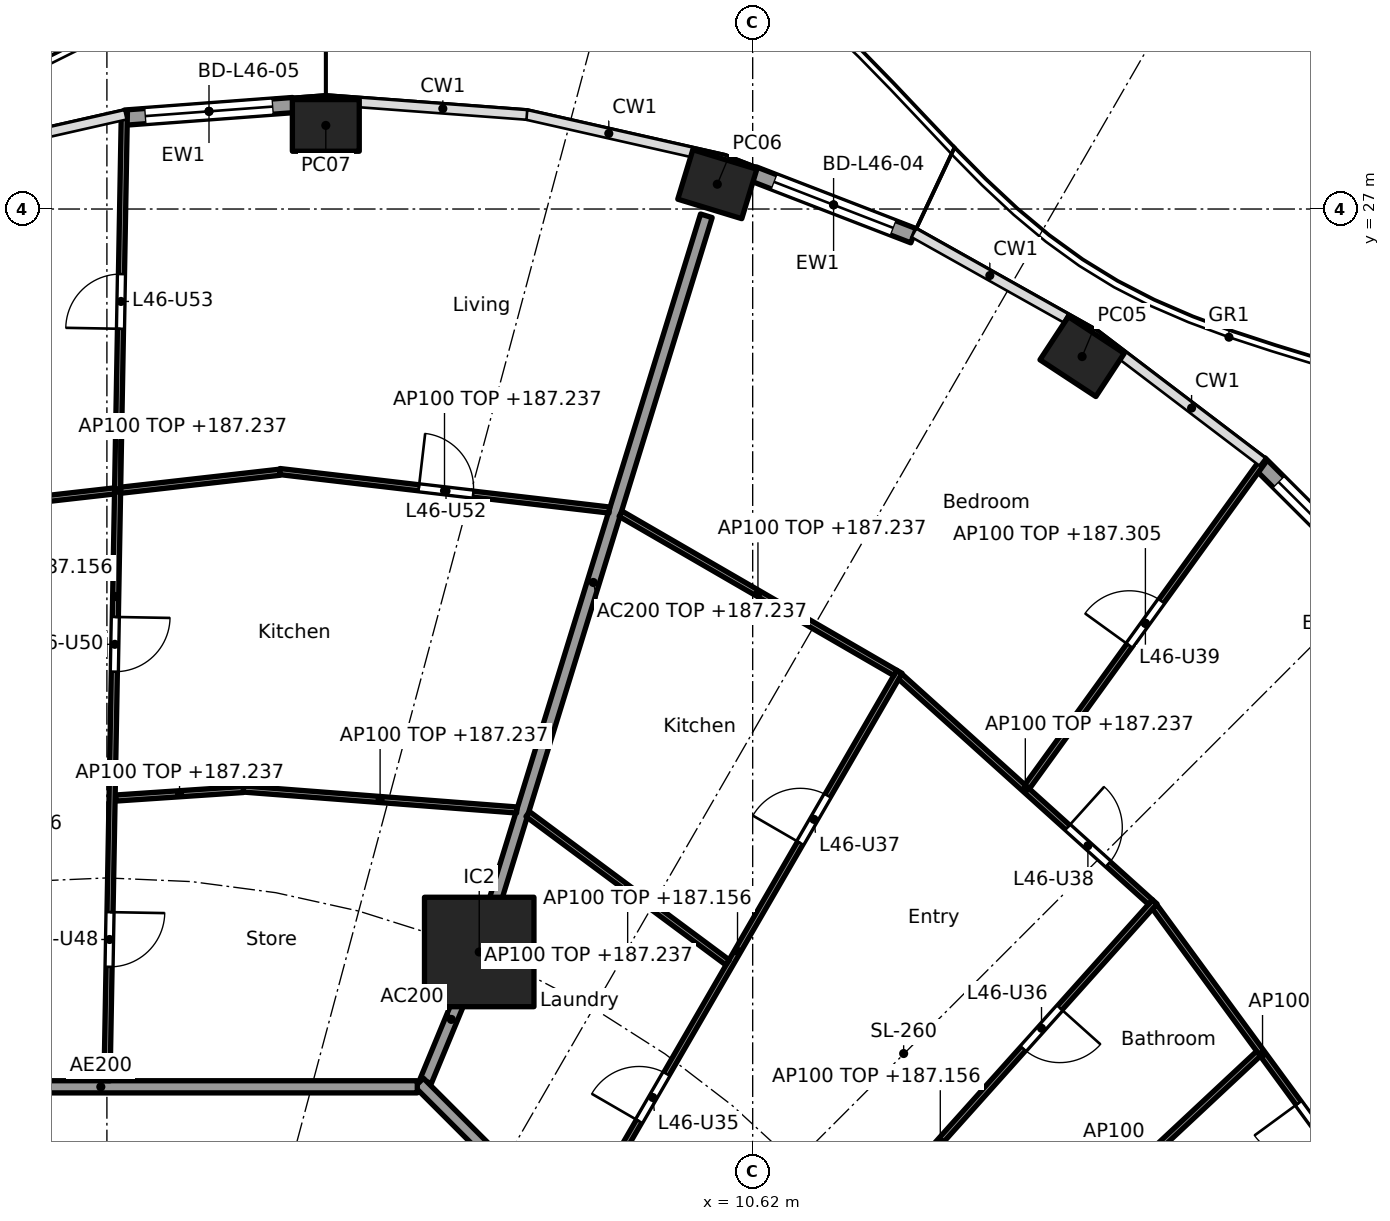
"""IFC4 building model, lengths in metres.
Left out: names, types, materials, properties, quantities, classifications, styles, units other than length and angle.
Written with IfcOpenShell. Run it as: python <this file> out.ifc"""

import sys

from ifc_helpers import new_model, si_unit, direction, frame, frame_2d, origin, origin_2d, place, context, subcontext, project, spatial, rectangle, hollow_rectangle, extrude, element, fill, save


model = new_model("IFC4")
c1 = context("Model", 3, precision=1e-05, world=origin(), true_north=direction((0.0, 1.0)))
c2 = subcontext(c1, "Body", "Model", "MODEL_VIEW")
j1 = project(units=[si_unit("LENGTHUNIT", "METRE"), si_unit("PLANEANGLEUNIT", "RADIAN")], contexts=[c1])
p1 = place(None, origin())
s1 = spatial("IfcSite", under=j1, at=p1, CompositionType="ELEMENT")
p2 = place(p1, origin())
s2 = spatial("IfcBuilding", under=s1, at=p2, CompositionType="ELEMENT")
p3 = place(p2, frame((0.0, 0.0, 184.4)))
s3 = spatial("IfcBuildingStorey", under=s2, at=p3, CompositionType="ELEMENT", Elevation=184.4)
for number, where, z_axis, x_axis in (
    (1, (16.038, 24.573, 0.0), (0.0, 0.0, 1.0), (-0.836, 0.549, 0.0)),
    (2, (10.038, 27.408, 0.0), (0.0, 0.0, 1.0), (-0.957, 0.292, 0.0)),
    (3, (3.6, 28.375, 0.0), (0.0, 0.0, 1.0), (-1.0, 0.0, 0.0)),
):
    element("IfcColumn", number, at=place(p3, frame(where, z_axis=z_axis, x_axis=x_axis)), inside=s3, PredefinedType="COLUMN", context=c2, shape_type="SweptSolid", body=[
        extrude(hollow_rectangle(XDim=1.1, YDim=0.85, WallThickness=0.036, at=origin_2d()), origin(), (0.0, 0.0, 1.0), 3.7),
    ])
p4 = place(p3, frame((6.123, 14.782, 0.0), z_axis=(0.0, 0.0, 1.0), x_axis=(1.0, 0.0, 0.0)))
e4 = element("IfcColumn", 4, at=p4, inside=s3, PredefinedType="COLUMN", context=c2, shape_type="SweptSolid", body=[
    extrude(rectangle(XDim=1.8, YDim=1.8, at=origin_2d()), origin(), (0.0, 0.0, 1.0), 3.7),
])
p5 = place(p3, frame((18.959, 22.82, 0.0), z_axis=(0.0, 0.0, 1.0), x_axis=(0.707844845069, -0.706367946122, 0.0)))
e5 = element("IfcWall", 5, at=p5, inside=s3, PredefinedType="SOLIDWALL", context=c2, shape_type="SweptSolid", body=[
    extrude(rectangle(XDim=2.976, YDim=0.25, at=frame_2d((1.488, 0.0))), origin(), (0.0, 0.0, 1.0), 3.44),
])
p6 = place(p5, frame((0.438, 0.0, 0.0)))
e6 = element("IfcOpeningElement", 6, at=p6, cuts=e5, PredefinedType="OPENING", context=c2, shape_type="SweptSolid", body=[
    extrude(rectangle(XDim=2.1, YDim=2.4, at=frame_2d((1.05, 1.2))), frame((0.0, 0.135, 0.0), z_axis=(0.0, -1.0, 0.0), x_axis=(1.0, 0.0, 0.0)), (0.0, 0.0, 1.0), 0.27),
])
p7 = place(p3, frame((10.635, 27.576, 0.0), z_axis=(0.0, 0.0, 1.0), x_axis=(0.932806734513, -0.360377019311, 0.0)))
e7 = element("IfcWall", 7, at=p7, inside=s3, PredefinedType="SOLIDWALL", context=c2, shape_type="SweptSolid", body=[
    extrude(rectangle(XDim=2.82, YDim=0.25, at=frame_2d((1.41, 0.0))), origin(), (0.0, 0.0, 1.0), 3.44),
])
p8 = place(p7, frame((0.36, 0.0, 0.0)))
e8 = element("IfcOpeningElement", 8, at=p8, cuts=e7, PredefinedType="OPENING", context=c2, shape_type="SweptSolid", body=[
    extrude(rectangle(XDim=2.1, YDim=2.4, at=frame_2d((1.05, 1.2))), frame((0.0, 0.135, 0.0), z_axis=(0.0, -1.0, 0.0), x_axis=(1.0, 0.0, 0.0)), (0.0, 0.0, 1.0), 0.27),
])
p9 = place(p3, frame((0.297, 28.503, 0.0), z_axis=(0.0, 0.0, 1.0), x_axis=(0.997232064422, 0.074351931305, 0.0)))
e9 = element("IfcWall", 9, at=p9, inside=s3, PredefinedType="SOLIDWALL", context=c2, shape_type="SweptSolid", body=[
    extrude(rectangle(XDim=2.771, YDim=0.25, at=frame_2d((1.386, 0.0))), origin(), (0.0, 0.0, 1.0), 3.44),
])
p10 = place(p9, frame((0.336, 0.0, 0.0)))
e10 = element("IfcOpeningElement", 10, at=p10, cuts=e9, PredefinedType="OPENING", context=c2, shape_type="SweptSolid", body=[
    extrude(rectangle(XDim=2.1, YDim=2.4, at=frame_2d((1.05, 1.2))), frame((0.0, 0.135, 0.0), z_axis=(0.0, -1.0, 0.0), x_axis=(1.0, 0.0, 0.0)), (0.0, 0.0, 1.0), 0.27),
])
p11 = place(p3, frame((5.243, 12.657, 0.0), z_axis=(0.0, 0.0, 1.0), x_axis=(0.382747093259, 0.923853160736, 0.0)))
e11 = element("IfcWall", 11, at=p11, inside=s3, PredefinedType="PARTITIONING", context=c2, shape_type="SweptSolid", body=[
    extrude(rectangle(XDim=2.2, YDim=0.2, at=frame_2d((1.1, 0.0))), origin(), (0.0, 0.0, 1.0), 3.44),
])
p12 = place(p3, frame((6.138, 14.83, 0.0), z_axis=(0.0, 0.0, 1.0), x_axis=(0.294818517221, 0.955553264818, 0.0)))
e12 = element("IfcWall", 12, at=p12, inside=s3, PredefinedType="PARTITIONING", context=c2, shape_type="SweptSolid", body=[
    extrude(rectangle(XDim=12.619, YDim=0.2, at=frame_2d((6.31, 0.0))), origin(), (0.0, 0.0, 1.0), 2.837),
])
p13 = place(p3, frame((12.635, 5.134, 0.0), z_axis=(0.0, 0.0, 1.0), x_axis=(-0.707106781187, 0.707106781187, 0.0)))
e13 = element("IfcWall", 13, at=p13, inside=s3, PredefinedType="PARTITIONING", context=c2, shape_type="SweptSolid", body=[
    extrude(rectangle(XDim=10.609, YDim=0.2, at=frame_2d((5.305, 0.0))), origin(), (0.0, 0.0, 1.0), 3.44),
])
p14 = place(p13, frame((4.804, 0.0, 0.0)))
e14 = element("IfcOpeningElement", 14, at=p14, cuts=e13, PredefinedType="OPENING", context=c2, shape_type="SweptSolid", body=[
    extrude(rectangle(XDim=1.0, YDim=2.1, at=frame_2d((0.5, 1.05))), frame((0.0, 0.11, 0.0), z_axis=(0.0, -1.0, 0.0), x_axis=(1.0, 0.0, 0.0)), (0.0, 0.0, 1.0), 0.22),
])
p15 = place(p3, frame((5.104, 12.565, 0.0), z_axis=(0.0, 0.0, 1.0), x_axis=(-1.0, 0.0, 0.0)))
e15 = element("IfcWall", 15, at=p15, inside=s3, PredefinedType="PARTITIONING", context=c2, shape_type="SweptSolid", body=[
    extrude(rectangle(XDim=10.409, YDim=0.2, at=frame_2d((5.205, 0.0))), origin(), (0.0, 0.0, 1.0), 3.44),
])
p16 = place(p15, frame((6.339, 0.0, 0.0)))
e16 = element("IfcOpeningElement", 16, at=p16, cuts=e15, PredefinedType="OPENING", context=c2, shape_type="SweptSolid", body=[
    extrude(rectangle(XDim=1.0, YDim=2.1, at=frame_2d((0.5, 1.05))), frame((0.0, 0.11, 0.0), z_axis=(0.0, -1.0, 0.0), x_axis=(1.0, 0.0, 0.0)), (0.0, 0.0, 1.0), 0.22),
])
p17 = place(p3, frame((20.781, 10.681, 0.0), z_axis=(0.0, 0.0, 1.0), x_axis=(-0.591117075283, 0.806585769345, 0.0)))
e17 = element("IfcWall", 17, at=p17, inside=s3, PredefinedType="PARTITIONING", context=c2, shape_type="SweptSolid", body=[
    extrude(rectangle(XDim=6.01, YDim=0.1, at=frame_2d((3.005, 0.0))), origin(), (0.0, 0.0, 1.0), 2.837),
])
p18 = place(p17, frame((1.103, 0.0, 0.0)))
e18 = element("IfcOpeningElement", 18, at=p18, cuts=e17, PredefinedType="OPENING", context=c2, shape_type="SweptSolid", body=[
    extrude(rectangle(XDim=0.9, YDim=2.1, at=frame_2d((0.45, 1.05))), frame((0.0, 0.06, 0.0), z_axis=(0.0, -1.0, 0.0), x_axis=(1.0, 0.0, 0.0)), (0.0, 0.0, 1.0), 0.12),
])
p19 = place(p3, frame((15.152, 9.573, 0.0), z_axis=(0.0, 0.0, 1.0), x_axis=(0.730723083214, 0.682673989294, 0.0)))
e19 = element("IfcWall", 19, at=p19, inside=s3, PredefinedType="PARTITIONING", context=c2, shape_type="SweptSolid", body=[
    extrude(rectangle(XDim=5.183, YDim=0.1, at=frame_2d((2.591, 0.0))), origin(), (0.0, 0.0, 1.0), 3.44),
])
p20 = place(p3, frame((10.178, 7.732, 0.0), z_axis=(0.0, 0.0, 1.0), x_axis=(0.667280084362, 0.744806880348, 0.0)))
e20 = element("IfcWall", 20, at=p20, inside=s3, PredefinedType="PARTITIONING", context=c2, shape_type="SweptSolid", body=[
    extrude(rectangle(XDim=10.572, YDim=0.1, at=frame_2d((5.286, 0.0))), origin(), (0.0, 0.0, 1.0), 2.756),
])
p21 = place(p20, frame((2.07, 0.0, 0.0)))
e21 = element("IfcOpeningElement", 21, at=p21, cuts=e20, PredefinedType="OPENING", context=c2, shape_type="SweptSolid", body=[
    extrude(rectangle(XDim=0.9, YDim=2.1, at=frame_2d((0.45, 1.05))), frame((0.0, 0.06, 0.0), z_axis=(0.0, -1.0, 0.0), x_axis=(1.0, 0.0, 0.0)), (0.0, 0.0, 1.0), 0.12),
])
p22 = place(p20, frame((7.331, 0.0, 0.0)))
e22 = element("IfcOpeningElement", 22, at=p22, cuts=e20, PredefinedType="OPENING", context=c2, shape_type="SweptSolid", body=[
    extrude(rectangle(XDim=0.9, YDim=2.1, at=frame_2d((0.45, 1.05))), frame((0.0, 0.06, 0.0), z_axis=(0.0, -1.0, 0.0), x_axis=(1.0, 0.0, 0.0)), (0.0, 0.0, 1.0), 0.12),
])
p23 = place(p3, frame((17.162, 15.603, 0.0), z_axis=(0.0, 0.0, 1.0), x_axis=(-0.742790086539, 0.66952437397, 0.0)))
e23 = element("IfcWall", 23, at=p23, inside=s3, PredefinedType="PARTITIONING", context=c2, shape_type="SweptSolid", body=[
    extrude(rectangle(XDim=5.542, YDim=0.1, at=frame_2d((2.771, 0.0))), origin(), (0.0, 0.0, 1.0), 2.837),
])
p24 = place(p23, frame((0.935, 0.0, 0.0)))
e24 = element("IfcOpeningElement", 24, at=p24, cuts=e23, PredefinedType="OPENING", context=c2, shape_type="SweptSolid", body=[
    extrude(rectangle(XDim=0.9, YDim=2.1, at=frame_2d((0.45, 1.05))), frame((0.0, 0.06, 0.0), z_axis=(0.0, -1.0, 0.0), x_axis=(1.0, 0.0, 0.0)), (0.0, 0.0, 1.0), 0.12),
])
p25 = place(p3, frame((15.133, 17.498, 0.0), z_axis=(0.0, 0.0, 1.0), x_axis=(0.586223556927, 0.810149332718, 0.0)))
e25 = element("IfcWall", 25, at=p25, inside=s3, PredefinedType="PARTITIONING", context=c2, shape_type="SweptSolid", body=[
    extrude(rectangle(XDim=6.638, YDim=0.1, at=frame_2d((3.319, 0.0))), origin(), (0.0, 0.0, 1.0), 2.905),
])
p26 = place(p25, frame((2.869, 0.0, 0.0)))
e26 = element("IfcOpeningElement", 26, at=p26, cuts=e25, PredefinedType="OPENING", context=c2, shape_type="SweptSolid", body=[
    extrude(rectangle(XDim=0.9, YDim=2.1, at=frame_2d((0.45, 1.05))), frame((0.0, 0.06, 0.0), z_axis=(0.0, -1.0, 0.0), x_axis=(1.0, 0.0, 0.0)), (0.0, 0.0, 1.0), 0.12),
])
p27 = place(p3, frame((7.708, 10.198, 0.0), z_axis=(0.0, 0.0, 1.0), x_axis=(0.501288100085, 0.865280440501, 0.0)))
e27 = element("IfcWall", 27, at=p27, inside=s3, PredefinedType="PARTITIONING", context=c2, shape_type="SweptSolid", body=[
    extrude(rectangle(XDim=10.623, YDim=0.1, at=frame_2d((5.312, 0.0))), origin(), (0.0, 0.0, 1.0), 2.756),
])
p28 = place(p27, frame((2.082, 0.0, 0.0)))
e28 = element("IfcOpeningElement", 28, at=p28, cuts=e27, PredefinedType="OPENING", context=c2, shape_type="SweptSolid", body=[
    extrude(rectangle(XDim=0.9, YDim=2.1, at=frame_2d((0.45, 1.05))), frame((0.0, 0.06, 0.0), z_axis=(0.0, -1.0, 0.0), x_axis=(1.0, 0.0, 0.0)), (0.0, 0.0, 1.0), 0.12),
])
p29 = place(p27, frame((7.369, 0.0, 0.0)))
e29 = element("IfcOpeningElement", 29, at=p29, cuts=e27, PredefinedType="OPENING", context=c2, shape_type="SweptSolid", body=[
    extrude(rectangle(XDim=0.9, YDim=2.1, at=frame_2d((0.45, 1.05))), frame((0.0, 0.06, 0.0), z_axis=(0.0, -1.0, 0.0), x_axis=(1.0, 0.0, 0.0)), (0.0, 0.0, 1.0), 0.12),
])
p30 = place(p3, frame((10.207, 14.61, 0.0), z_axis=(0.0, 0.0, 1.0), x_axis=(-0.802769141821, 0.596289950394, 0.0)))
e30 = element("IfcWall", 30, at=p30, inside=s3, PredefinedType="PARTITIONING", context=c2, shape_type="SweptSolid", body=[
    extrude(rectangle(XDim=4.092, YDim=0.1, at=frame_2d((2.046, 0.0))), origin(), (0.0, 0.0, 1.0), 2.837),
])
p31 = place(p3, frame((12.965, 19.371, 0.0), z_axis=(0.0, 0.0, 1.0), x_axis=(-0.865286427811, 0.501277765163, 0.0)))
e31 = element("IfcWall", 31, at=p31, inside=s3, PredefinedType="PARTITIONING", context=c2, shape_type="SweptSolid", body=[
    extrude(rectangle(XDim=5.22, YDim=0.1, at=frame_2d((2.61, 0.0))), origin(), (0.0, 0.0, 1.0), 2.837),
])
p32 = place(p3, frame((6.741, 17.117, 0.0), z_axis=(0.0, 0.0, 1.0), x_axis=(-0.997078320723, 0.076386008825, 0.0)))
e32 = element("IfcWall", 32, at=p32, inside=s3, PredefinedType="PARTITIONING", context=c2, shape_type="SweptSolid", body=[
    extrude(rectangle(XDim=4.51, YDim=0.1, at=frame_2d((2.255, 0.0))), origin(), (0.0, 0.0, 1.0), 2.837),
])
p33 = place(p3, frame((8.262, 22.05, 0.0), z_axis=(0.0, 0.0, 1.0), x_axis=(-0.993250089265, 0.115992500516, 0.0)))
e33 = element("IfcWall", 33, at=p33, inside=s3, PredefinedType="PARTITIONING", context=c2, shape_type="SweptSolid", body=[
    extrude(rectangle(XDim=5.458, YDim=0.1, at=frame_2d((2.729, 0.0))), origin(), (0.0, 0.0, 1.0), 2.837),
])
p34 = place(p33, frame((2.254, 0.0, 0.0)))
e34 = element("IfcOpeningElement", 34, at=p34, cuts=e33, PredefinedType="OPENING", context=c2, shape_type="SweptSolid", body=[
    extrude(rectangle(XDim=0.9, YDim=2.1, at=frame_2d((0.45, 1.05))), frame((0.0, 0.06, 0.0), z_axis=(0.0, -1.0, 0.0), x_axis=(1.0, 0.0, 0.0)), (0.0, 0.0, 1.0), 0.12),
])
p35 = place(p3, frame((2.244, 17.455, 0.0), z_axis=(0.0, 0.0, 1.0), x_axis=(-0.997756833447, -0.06694252243, 0.0)))
e35 = element("IfcWall", 35, at=p35, inside=s3, PredefinedType="PARTITIONING", context=c2, shape_type="SweptSolid", body=[
    extrude(rectangle(XDim=2.104, YDim=0.1, at=frame_2d((1.052, 0.0))), origin(), (0.0, 0.0, 1.0), 2.837),
])
p36 = place(p3, frame((2.842, 22.671, 0.0), z_axis=(0.0, 0.0, 1.0), x_axis=(-0.993660315081, -0.112424099879, 0.0)))
e36 = element("IfcWall", 36, at=p36, inside=s3, PredefinedType="PARTITIONING", context=c2, shape_type="SweptSolid", body=[
    extrude(rectangle(XDim=5.325, YDim=0.1, at=frame_2d((2.662, 0.0))), origin(), (0.0, 0.0, 1.0), 2.837),
])
p37 = place(p3, frame((0.002, 12.665, 0.0), z_axis=(0.0, 0.0, 1.0), x_axis=(0.01792079652, 0.999839409631, 0.0)))
e37 = element("IfcWall", 37, at=p37, inside=s3, PredefinedType="PARTITIONING", context=c2, shape_type="SweptSolid", body=[
    extrude(rectangle(XDim=15.926, YDim=0.1, at=frame_2d((7.963, 0.0))), origin(), (0.0, 0.0, 1.0), 2.756),
])
p38 = place(p37, frame((1.873, 0.0, 0.0)))
e38 = element("IfcOpeningElement", 38, at=p38, cuts=e37, PredefinedType="OPENING", context=c2, shape_type="SweptSolid", body=[
    extrude(rectangle(XDim=0.9, YDim=2.1, at=frame_2d((0.45, 1.05))), frame((0.0, 0.06, 0.0), z_axis=(0.0, -1.0, 0.0), x_axis=(1.0, 0.0, 0.0)), (0.0, 0.0, 1.0), 0.12),
])
p39 = place(p37, frame((6.728, 0.0, 0.0)))
e39 = element("IfcOpeningElement", 39, at=p39, cuts=e37, PredefinedType="OPENING", context=c2, shape_type="SweptSolid", body=[
    extrude(rectangle(XDim=0.9, YDim=2.1, at=frame_2d((0.45, 1.05))), frame((0.0, 0.06, 0.0), z_axis=(0.0, -1.0, 0.0), x_axis=(1.0, 0.0, 0.0)), (0.0, 0.0, 1.0), 0.12),
])
p40 = place(p37, frame((12.367, 0.0, 0.0)))
e40 = element("IfcOpeningElement", 40, at=p40, cuts=e37, PredefinedType="OPENING", context=c2, shape_type="SweptSolid", body=[
    extrude(rectangle(XDim=0.9, YDim=2.1, at=frame_2d((0.45, 1.05))), frame((0.0, 0.06, 0.0), z_axis=(0.0, -1.0, 0.0), x_axis=(1.0, 0.0, 0.0)), (0.0, 0.0, 1.0), 0.12),
])
p41 = place(p6, origin())
e41 = element("IfcDoor", 41, at=p41, inside=s3, OperationType="SLIDING_TO_LEFT", PredefinedType="DOOR", context=c2, shape_type="SweptSolid", body=[
    extrude(rectangle(XDim=2.1, YDim=2.4, at=frame_2d((1.05, 1.2))), frame((0.0, 0.025, 0.0), z_axis=(0.0, -1.0, 0.0), x_axis=(1.0, 0.0, 0.0)), (0.0, 0.0, 1.0), 0.05),
])
fill(e6, e41)
p42 = place(p8, origin())
e42 = element("IfcDoor", 42, at=p42, inside=s3, OperationType="SLIDING_TO_LEFT", PredefinedType="DOOR", context=c2, shape_type="SweptSolid", body=[
    extrude(rectangle(XDim=2.1, YDim=2.4, at=frame_2d((1.05, 1.2))), frame((0.0, 0.025, 0.0), z_axis=(0.0, -1.0, 0.0), x_axis=(1.0, 0.0, 0.0)), (0.0, 0.0, 1.0), 0.05),
])
fill(e8, e42)
p43 = place(p10, origin())
e43 = element("IfcDoor", 43, at=p43, inside=s3, OperationType="SLIDING_TO_LEFT", PredefinedType="DOOR", context=c2, shape_type="SweptSolid", body=[
    extrude(rectangle(XDim=2.1, YDim=2.4, at=frame_2d((1.05, 1.2))), frame((0.0, 0.025, 0.0), z_axis=(0.0, -1.0, 0.0), x_axis=(1.0, 0.0, 0.0)), (0.0, 0.0, 1.0), 0.05),
])
fill(e10, e43)
p44 = place(p28, origin())
e44 = element("IfcDoor", 44, at=p44, inside=s3, OperationType="SINGLE_SWING_LEFT", PredefinedType="DOOR", context=c2, shape_type="SweptSolid", body=[
    extrude(rectangle(XDim=0.9, YDim=2.1, at=frame_2d((0.45, 1.05))), frame((0.0, 0.025, 0.0), z_axis=(0.0, -1.0, 0.0), x_axis=(1.0, 0.0, 0.0)), (0.0, 0.0, 1.0), 0.05),
])
fill(e28, e44)
p45 = place(p22, frame((0.9, 0.0, 0.0), x_axis=(-1.0, 0.0, 0.0)))
e45 = element("IfcDoor", 45, at=p45, inside=s3, OperationType="SINGLE_SWING_LEFT", PredefinedType="DOOR", context=c2, shape_type="SweptSolid", body=[
    extrude(rectangle(XDim=0.9, YDim=2.1, at=frame_2d((0.45, 1.05))), frame((0.0, 0.025, 0.0), z_axis=(0.0, -1.0, 0.0), x_axis=(1.0, 0.0, 0.0)), (0.0, 0.0, 1.0), 0.05),
])
fill(e22, e45)
p46 = place(p29, origin())
e46 = element("IfcDoor", 46, at=p46, inside=s3, OperationType="SINGLE_SWING_LEFT", PredefinedType="DOOR", context=c2, shape_type="SweptSolid", body=[
    extrude(rectangle(XDim=0.9, YDim=2.1, at=frame_2d((0.45, 1.05))), frame((0.0, 0.025, 0.0), z_axis=(0.0, -1.0, 0.0), x_axis=(1.0, 0.0, 0.0)), (0.0, 0.0, 1.0), 0.05),
])
fill(e29, e46)
p47 = place(p24, frame((0.9, 0.0, 0.0), x_axis=(-1.0, 0.0, 0.0)))
e47 = element("IfcDoor", 47, at=p47, inside=s3, OperationType="SINGLE_SWING_LEFT", PredefinedType="DOOR", context=c2, shape_type="SweptSolid", body=[
    extrude(rectangle(XDim=0.9, YDim=2.1, at=frame_2d((0.45, 1.05))), frame((0.0, 0.025, 0.0), z_axis=(0.0, -1.0, 0.0), x_axis=(1.0, 0.0, 0.0)), (0.0, 0.0, 1.0), 0.05),
])
fill(e24, e47)
p48 = place(p26, origin())
e48 = element("IfcDoor", 48, at=p48, inside=s3, OperationType="SINGLE_SWING_LEFT", PredefinedType="DOOR", context=c2, shape_type="SweptSolid", body=[
    extrude(rectangle(XDim=0.9, YDim=2.1, at=frame_2d((0.45, 1.05))), frame((0.0, 0.025, 0.0), z_axis=(0.0, -1.0, 0.0), x_axis=(1.0, 0.0, 0.0)), (0.0, 0.0, 1.0), 0.05),
])
fill(e26, e48)
p49 = place(p18, origin())
e49 = element("IfcDoor", 49, at=p49, inside=s3, OperationType="SINGLE_SWING_RIGHT", PredefinedType="DOOR", context=c2, shape_type="SweptSolid", body=[
    extrude(rectangle(XDim=0.9, YDim=2.1, at=frame_2d((0.45, 1.05))), frame((0.0, 0.025, 0.0), z_axis=(0.0, -1.0, 0.0), x_axis=(1.0, 0.0, 0.0)), (0.0, 0.0, 1.0), 0.05),
])
fill(e18, e49)
p50 = place(p38, frame((0.9, 0.0, 0.0), x_axis=(-1.0, 0.0, 0.0)))
e50 = element("IfcDoor", 50, at=p50, inside=s3, OperationType="SINGLE_SWING_LEFT", PredefinedType="DOOR", context=c2, shape_type="SweptSolid", body=[
    extrude(rectangle(XDim=0.9, YDim=2.1, at=frame_2d((0.45, 1.05))), frame((0.0, 0.025, 0.0), z_axis=(0.0, -1.0, 0.0), x_axis=(1.0, 0.0, 0.0)), (0.0, 0.0, 1.0), 0.05),
])
fill(e38, e50)
p51 = place(p39, frame((0.9, 0.0, 0.0), x_axis=(-1.0, 0.0, 0.0)))
e51 = element("IfcDoor", 51, at=p51, inside=s3, OperationType="SINGLE_SWING_LEFT", PredefinedType="DOOR", context=c2, shape_type="SweptSolid", body=[
    extrude(rectangle(XDim=0.9, YDim=2.1, at=frame_2d((0.45, 1.05))), frame((0.0, 0.025, 0.0), z_axis=(0.0, -1.0, 0.0), x_axis=(1.0, 0.0, 0.0)), (0.0, 0.0, 1.0), 0.05),
])
fill(e39, e51)
p52 = place(p34, frame((0.9, 0.0, 0.0), x_axis=(-1.0, 0.0, 0.0)))
e52 = element("IfcDoor", 52, at=p52, inside=s3, OperationType="SINGLE_SWING_LEFT", PredefinedType="DOOR", context=c2, shape_type="SweptSolid", body=[
    extrude(rectangle(XDim=0.9, YDim=2.1, at=frame_2d((0.45, 1.05))), frame((0.0, 0.025, 0.0), z_axis=(0.0, -1.0, 0.0), x_axis=(1.0, 0.0, 0.0)), (0.0, 0.0, 1.0), 0.05),
])
fill(e34, e52)
p53 = place(p40, origin())
e53 = element("IfcDoor", 53, at=p53, inside=s3, OperationType="SINGLE_SWING_LEFT", PredefinedType="DOOR", context=c2, shape_type="SweptSolid", body=[
    extrude(rectangle(XDim=0.9, YDim=2.1, at=frame_2d((0.45, 1.05))), frame((0.0, 0.025, 0.0), z_axis=(0.0, -1.0, 0.0), x_axis=(1.0, 0.0, 0.0)), (0.0, 0.0, 1.0), 0.05),
])
fill(e40, e53)
save(model, sys.argv[1])
